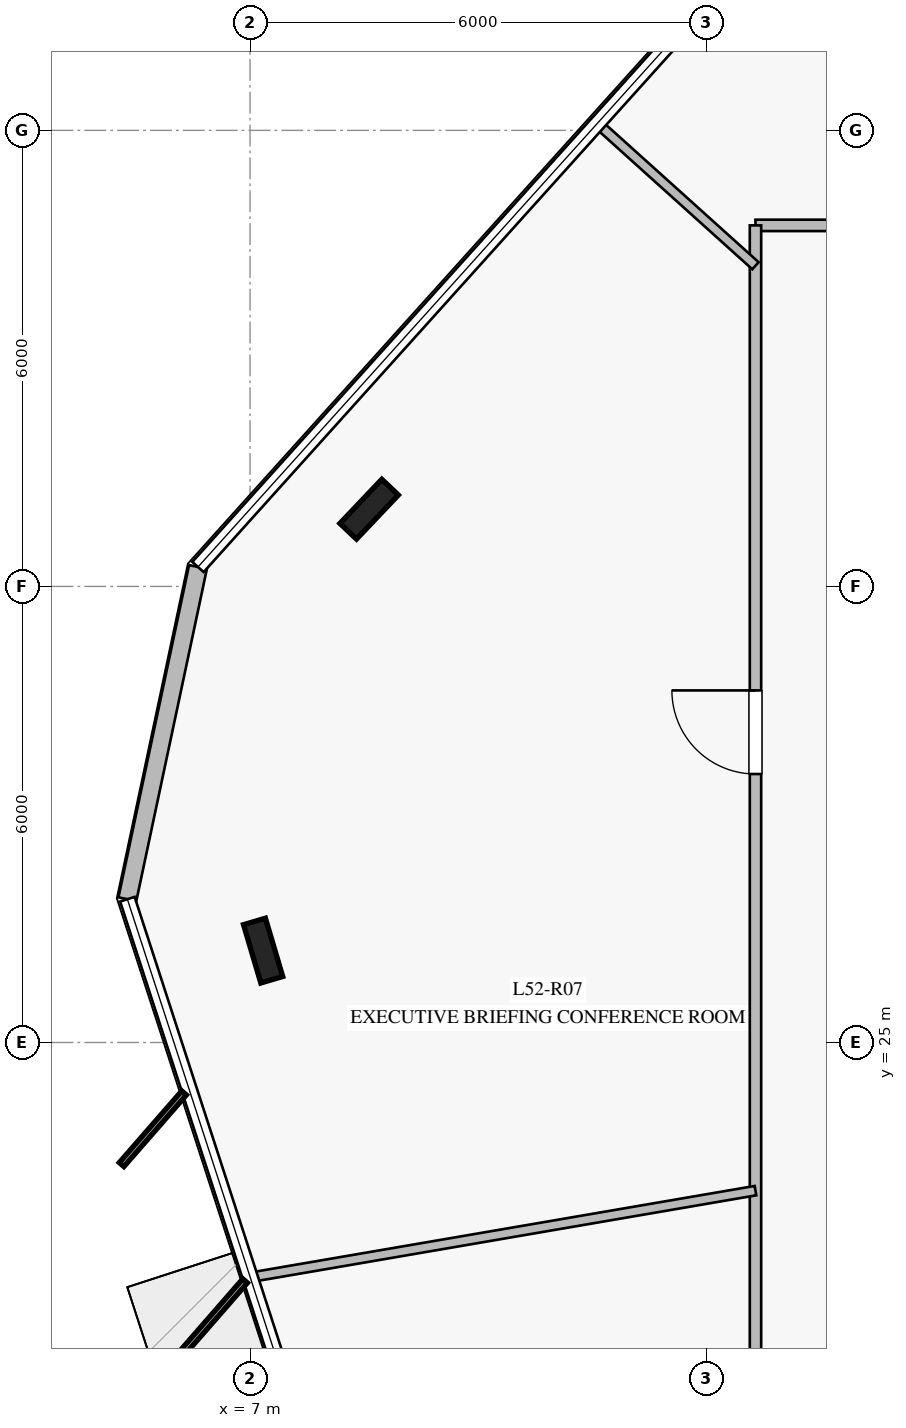
"""IFC4 building model, lengths in metres.
Left out: names, types, materials, properties, quantities, classifications, styles, units other than length and angle.
Written with IfcOpenShell. Run it as: python <this file> out.ifc"""

import sys

from ifc_helpers import new_model, si_unit, direction, frame, frame_2d, origin, origin_2d, place, context, subcontext, project, spatial, rectangle, i_section, extrude, element, fill, save


model = new_model("IFC4")
c1 = context("Model", 3, precision=1e-05, world=origin(), true_north=direction((0.0, 1.0)))
c2 = subcontext(c1, "Body", "Model", "MODEL_VIEW")
j1 = project(units=[si_unit("LENGTHUNIT", "METRE"), si_unit("PLANEANGLEUNIT", "RADIAN")], contexts=[c1])
p1 = place(None, origin())
s1 = spatial("IfcSite", under=j1, at=p1, CompositionType="ELEMENT")
p2 = place(p1, origin())
s2 = spatial("IfcBuilding", under=s1, at=p2, CompositionType="ELEMENT")
p3 = place(p2, frame((0.0, 0.0, 216.8)))
s3 = spatial("IfcBuildingStorey", under=s2, at=p3, CompositionType="ELEMENT", Elevation=216.8)
for number, where, z_axis, x_axis in (
    (1, (8.567, 32.016, 0.0), (0.0, 0.0, 1.0), (0.688, 0.725, 0.0)),
    (2, (7.172, 26.209, 0.0), (0.0, 0.0, 1.0), (-0.284, 0.959, 0.0)),
):
    element("IfcColumn", number, at=place(p3, frame(where, z_axis=z_axis, x_axis=x_axis)), inside=s3, PredefinedType="COLUMN", context=c2, shape_type="SweptSolid", body=[
        extrude(i_section(OverallWidth=0.3, OverallDepth=0.8, WebThickness=0.018, FlangeThickness=0.033, at=origin_2d()), origin(), (0.0, 0.0, 1.0), 4.0),
    ])
p4 = place(p3, frame((6.315, 31.256, 0.0), z_axis=(0.0, 0.0, 1.0), x_axis=(-0.20787966491, -0.978154407503, 0.0)))
e3 = element("IfcWall", 3, at=p4, inside=s3, PredefinedType="STANDARD", context=c2, shape_type="SweptSolid", body=[
    extrude(rectangle(XDim=4.469, YDim=0.24, at=frame_2d((2.234, 0.0))), origin(), (0.0, 0.0, 1.0), 3.78),
])
p5 = place(p3, frame((13.65, 35.75, 0.0), z_axis=(0.0, 0.0, 1.0), x_axis=(1.0, 0.0, 0.0)))
e4 = element("IfcWall", 4, at=p5, inside=s3, PredefinedType="PARTITIONING", context=c2, shape_type="SweptSolid", body=[
    extrude(rectangle(XDim=22.7, YDim=0.15, at=frame_2d((11.35, 0.0))), origin(), (0.0, 0.0, 1.0), 3.05),
])
p6 = place(p5, frame((16.645, 0.0, 0.0)))
e5 = element("IfcOpeningElement", 5, at=p6, cuts=e4, PredefinedType="OPENING", context=c2, shape_type="SweptSolid", body=[
    extrude(rectangle(XDim=1.1, YDim=2.2, at=frame_2d((0.55, 1.1))), frame((0.0, 0.085, 0.0), z_axis=(0.0, -1.0, 0.0), x_axis=(1.0, 0.0, 0.0)), (0.0, 0.0, 1.0), 0.17),
])
p7 = place(p5, frame((5.662, 0.0, 0.0)))
e6 = element("IfcOpeningElement", 6, at=p7, cuts=e4, PredefinedType="OPENING", context=c2, shape_type="SweptSolid", body=[
    extrude(rectangle(XDim=1.1, YDim=2.2, at=frame_2d((0.55, 1.1))), frame((0.0, 0.085, 0.0), z_axis=(0.0, -1.0, 0.0), x_axis=(1.0, 0.0, 0.0)), (0.0, 0.0, 1.0), 0.17),
])
p8 = place(p3, frame((13.65, 14.25, 0.0), z_axis=(0.0, 0.0, 1.0), x_axis=(0.0, 1.0, 0.0)))
e7 = element("IfcWall", 7, at=p8, inside=s3, PredefinedType="PARTITIONING", context=c2, shape_type="SweptSolid", body=[
    extrude(rectangle(XDim=21.5, YDim=0.15, at=frame_2d((10.75, 0.0))), origin(), (0.0, 0.0, 1.0), 3.28),
])
p9 = place(p8, frame((14.282, 0.0, 0.0)))
e8 = element("IfcOpeningElement", 8, at=p9, cuts=e7, PredefinedType="OPENING", context=c2, shape_type="SweptSolid", body=[
    extrude(rectangle(XDim=1.1, YDim=2.2, at=frame_2d((0.55, 1.1))), frame((0.0, 0.085, 0.0), z_axis=(0.0, -1.0, 0.0), x_axis=(1.0, 0.0, 0.0)), (0.0, 0.0, 1.0), 0.17),
])
p10 = place(p3, frame((13.65, 35.219, 0.0), z_axis=(0.0, 0.0, 1.0), x_axis=(-0.743119619427, 0.669158599453, 0.0)))
e9 = element("IfcWall", 9, at=p10, inside=s3, PredefinedType="PARTITIONING", context=c2, shape_type="SweptSolid", body=[
    extrude(rectangle(XDim=2.783, YDim=0.125, at=frame_2d((1.391, 0.0))), origin(), (0.0, 0.0, 1.0), 3.18),
])
p11 = place(p3, frame((13.65, 23.051, 0.0), z_axis=(0.0, 0.0, 1.0), x_axis=(-0.985592022729, -0.169140074298, 0.0)))
e10 = element("IfcWall", 10, at=p11, inside=s3, PredefinedType="PARTITIONING", context=c2, shape_type="SweptSolid", body=[
    extrude(rectangle(XDim=6.728, YDim=0.125, at=frame_2d((3.364, 0.0))), origin(), (0.0, 0.0, 1.0), 3.18),
])
p12 = place(p9, origin())
e11 = element("IfcDoor", 11, at=p12, inside=s3, OperationType="SINGLE_SWING_RIGHT", PredefinedType="DOOR", context=c2, shape_type="SweptSolid", body=[
    extrude(rectangle(XDim=1.1, YDim=2.2, at=frame_2d((0.55, 1.1))), frame((0.0, 0.025, 0.0), z_axis=(0.0, -1.0, 0.0), x_axis=(1.0, 0.0, 0.0)), (0.0, 0.0, 1.0), 0.05),
])
fill(e8, e11)
save(model, sys.argv[1])
